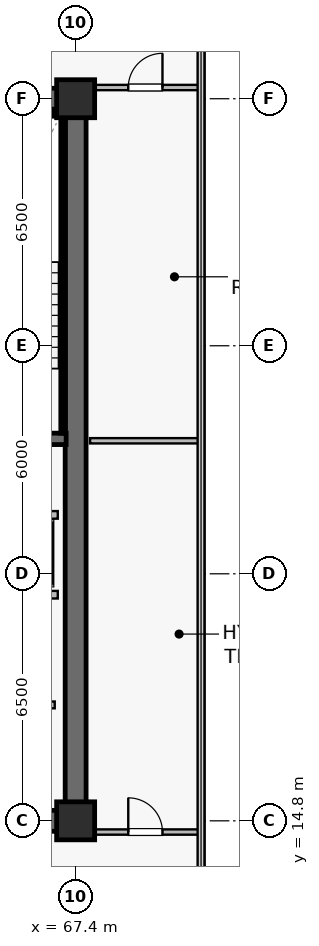
"""IFC4 building model, lengths in metres.
Left out: names, types, materials, properties, quantities, classifications, styles, units other than length and angle.
Written with IfcOpenShell. Run it as: python <this file> out.ifc"""

import sys

from ifc_helpers import new_model, si_unit, direction, frame, frame_2d, origin, origin_2d, place, context, subcontext, project, spatial, rectangle, extrude, source, transform, mapped, element, fill, save


model = new_model("IFC4")
c1 = context("Model", 3, precision=1e-05, world=origin(), true_north=direction((0.0, 1.0)))
c2 = subcontext(c1, "Body", "Model", "MODEL_VIEW")
j1 = project(units=[si_unit("LENGTHUNIT", "METRE"), si_unit("PLANEANGLEUNIT", "RADIAN")], contexts=[c1])
p1 = place(None, origin())
s1 = spatial("IfcSite", under=j1, at=p1, CompositionType="ELEMENT")
p2 = place(p1, origin())
s2 = spatial("IfcBuilding", under=s1, at=p2, CompositionType="ELEMENT")
p3 = place(p2, frame((0.0, 0.0, 221.9)))
s3 = spatial("IfcBuildingStorey", under=s2, at=p3, CompositionType="ELEMENT", Elevation=221.9)
p4 = place(p3, frame((52.325, 14.8, 0.0), z_axis=(0.0, 0.0, 1.0), x_axis=(1.0, 0.0, 0.0)))
e1 = element("IfcWall", 1, at=p4, inside=s3, PredefinedType="SHEAR", context=c2, shape_type="SweptSolid", body=[
    extrude(rectangle(XDim=15.35, YDim=0.55, at=frame_2d((7.675, 0.0))), origin(), (0.0, 0.0, 1.0), 3.8),
])
p5 = place(p3, frame((52.325, 33.8, 0.0), z_axis=(0.0, 0.0, 1.0), x_axis=(1.0, 0.0, 0.0)))
e2 = element("IfcWall", 2, at=p5, inside=s3, PredefinedType="SHEAR", context=c2, shape_type="SweptSolid", body=[
    extrude(rectangle(XDim=15.35, YDim=0.55, at=frame_2d((7.675, 0.0))), origin(), (0.0, 0.0, 1.0), 3.8),
])
p6 = place(p5, frame((8.775, 0.0, 0.0)))
e3 = element("IfcOpeningElement", 3, at=p6, cuts=e2, PredefinedType="OPENING", context=c2, shape_type="SweptSolid", body=[
    extrude(rectangle(XDim=0.95, YDim=2.15, at=frame_2d((0.475, 1.075))), frame((0.0, 0.285, 0.0), z_axis=(0.0, -1.0, 0.0), x_axis=(1.0, 0.0, 0.0)), (0.0, 0.0, 1.0), 0.57),
])
p7 = place(p5, frame((5.41, 0.0, 0.0)))
e4 = element("IfcOpeningElement", 4, at=p7, cuts=e2, PredefinedType="OPENING", context=c2, shape_type="SweptSolid", body=[
    extrude(rectangle(XDim=0.95, YDim=2.15, at=frame_2d((0.475, 1.075))), frame((0.0, 0.285, 0.0), z_axis=(0.0, -1.0, 0.0), x_axis=(1.0, 0.0, 0.0)), (0.0, 0.0, 1.0), 0.57),
])
p8 = place(p5, frame((2.01, 0.0, 0.0)))
e5 = element("IfcOpeningElement", 5, at=p8, cuts=e2, PredefinedType="OPENING", context=c2, shape_type="SweptSolid", body=[
    extrude(rectangle(XDim=0.95, YDim=2.15, at=frame_2d((0.475, 1.075))), frame((0.0, 0.285, 0.0), z_axis=(0.0, -1.0, 0.0), x_axis=(1.0, 0.0, 0.0)), (0.0, 0.0, 1.0), 0.57),
])
p9 = place(p3, frame((67.4, 15.075, 0.0), z_axis=(0.0, 0.0, 1.0), x_axis=(0.0, 1.0, 0.0)))
e6 = element("IfcWall", 6, at=p9, inside=s3, PredefinedType="SHEAR", context=c2, shape_type="SweptSolid", body=[
    extrude(rectangle(XDim=18.45, YDim=0.55, at=frame_2d((9.225, 0.0))), origin(), (0.0, 0.0, 1.0), 3.8),
])
p10 = place(p3, frame((63.35, 24.85, 0.0), z_axis=(0.0, 0.0, 1.0), x_axis=(1.0, 0.0, 0.0)))
e7 = element("IfcWall", 7, at=p10, inside=s3, PredefinedType="SHEAR", context=c2, shape_type="SweptSolid", body=[
    extrude(rectangle(XDim=3.8, YDim=0.3, at=frame_2d((1.9, 0.0))), origin(), (0.0, 0.0, 1.0), 3.8),
])
p11 = place(p3, frame((63.35, 33.4, 0.0), z_axis=(0.0, 0.0, 1.0), x_axis=(1.0, 0.0, 0.0)))
e8 = element("IfcWall", 8, at=p11, inside=s3, PredefinedType="SOLIDWALL", context=c2, shape_type="SweptSolid", body=[
    extrude(rectangle(XDim=3.72, YDim=0.12, at=frame_2d((1.86, 0.0))), origin(), (0.0, 0.0, 1.0), 3.8),
])
p12 = place(p3, frame((67.07, 25.0, 0.0), z_axis=(0.0, 0.0, 1.0), x_axis=(0.0, 1.0, 0.0)))
e9 = element("IfcWall", 9, at=p12, inside=s3, PredefinedType="SOLIDWALL", context=c2, shape_type="SweptSolid", body=[
    extrude(rectangle(XDim=8.32, YDim=0.12, at=frame_2d((4.16, 0.0))), origin(), (0.0, 0.0, 1.0), 3.8),
])
m1 = source(origin(), c2, "Body", "SweptSolid", [
    extrude(rectangle(XDim=1.0, YDim=1.0, at=origin_2d()), origin(), (0.0, 0.0, 1.0), 4.1),
])
for number, where, z_axis, x_axis in (
    (10, (67.4, 14.8, 0.0), (0.0, 0.0, 1.0), (1.0, 0.0, 0.0)),
    (11, (67.4, 33.8, 0.0), (0.0, 0.0, 1.0), (1.0, 0.0, 0.0)),
):
    element("IfcColumn", number, at=place(p3, frame(where, z_axis=z_axis, x_axis=x_axis)), inside=s3, PredefinedType="COLUMN", context=c2, shape_type="MappedRepresentation", body=[
        mapped(m1, transform((0.0, 0.0, 0.0), scale=1.0)),
    ])
p13 = place(p3, frame((64.67, 20.75, 0.0), z_axis=(0.0, 0.0, 1.0), x_axis=(1.0, 0.0, 0.0)))
e12 = element("IfcWall", 12, at=p13, inside=s3, PredefinedType="SOLIDWALL", context=c2, shape_type="SweptSolid", body=[
    extrude(rectangle(XDim=2.26, YDim=0.2, at=frame_2d((1.13, 0.0))), origin(), (0.0, 0.0, 1.0), 3.8),
])
p14 = place(p13, frame((0.58, 0.0, 0.0)))
e13 = element("IfcOpeningElement", 13, at=p14, cuts=e12, PredefinedType="OPENING", context=c2, shape_type="SweptSolid", body=[
    extrude(rectangle(XDim=1.1, YDim=2.22, at=frame_2d((0.55, 1.11))), frame((0.0, 0.11, 0.0), z_axis=(0.0, -1.0, 0.0), x_axis=(1.0, 0.0, 0.0)), (0.0, 0.0, 1.0), 0.22),
])
p15 = place(p3, frame((64.67, 22.85, 0.0), z_axis=(0.0, 0.0, 1.0), x_axis=(1.0, 0.0, 0.0)))
e14 = element("IfcWall", 14, at=p15, inside=s3, PredefinedType="SOLIDWALL", context=c2, shape_type="SweptSolid", body=[
    extrude(rectangle(XDim=2.26, YDim=0.2, at=frame_2d((1.13, 0.0))), origin(), (0.0, 0.0, 1.0), 3.8),
])
p16 = place(p3, frame((61.85, 17.85, 0.0), z_axis=(0.0, 0.0, 1.0), x_axis=(1.0, 0.0, 0.0)))
e15 = element("IfcWall", 15, at=p16, inside=s3, PredefinedType="SOLIDWALL", context=c2, shape_type="SweptSolid", body=[
    extrude(rectangle(XDim=5.0, YDim=0.18, at=frame_2d((2.5, 0.0))), origin(), (0.0, 0.0, 1.0), 3.8),
])
p17 = place(p16, frame((2.025, 0.0, 0.0)))
e16 = element("IfcOpeningElement", 16, at=p17, cuts=e15, PredefinedType="OPENING", context=c2, shape_type="SweptSolid", body=[
    extrude(rectangle(XDim=0.95, YDim=2.15, at=frame_2d((0.475, 1.075))), frame((0.0, 0.1, 0.0), z_axis=(0.0, -1.0, 0.0), x_axis=(1.0, 0.0, 0.0)), (0.0, 0.0, 1.0), 0.2),
])
p18 = place(p3, frame((67.78, 24.8, 0.0), z_axis=(0.0, 0.0, 1.0), x_axis=(1.0, 0.0, 0.0)))
e17 = element("IfcWall", 17, at=p18, inside=s3, PredefinedType="PARTITIONING", context=c2, shape_type="SweptSolid", body=[
    extrude(rectangle(XDim=2.91, YDim=0.14, at=frame_2d((1.455, 0.0))), origin(), (0.0, 0.0, 1.0), 3.8),
])
p19 = place(p3, frame((67.78, 14.505, 0.0), z_axis=(0.0, 0.0, 1.0), x_axis=(1.0, 0.0, 0.0)))
e18 = element("IfcWall", 18, at=p19, inside=s3, PredefinedType="PARTITIONING", context=c2, shape_type="SweptSolid", body=[
    extrude(rectangle(XDim=2.91, YDim=0.14, at=frame_2d((1.455, 0.0))), origin(), (0.0, 0.0, 1.0), 3.8),
])
p20 = place(p19, frame((1.005, 0.0, 0.0)))
e19 = element("IfcOpeningElement", 19, at=p20, cuts=e18, PredefinedType="OPENING", context=c2, shape_type="SweptSolid", body=[
    extrude(rectangle(XDim=0.9, YDim=2.1, at=frame_2d((0.45, 1.05))), frame((0.0, 0.08, 0.0), z_axis=(0.0, -1.0, 0.0), x_axis=(1.0, 0.0, 0.0)), (0.0, 0.0, 1.0), 0.16),
])
p21 = place(p3, frame((67.78, 34.095, 0.0), z_axis=(0.0, 0.0, 1.0), x_axis=(1.0, 0.0, 0.0)))
e20 = element("IfcWall", 20, at=p21, inside=s3, PredefinedType="PARTITIONING", context=c2, shape_type="SweptSolid", body=[
    extrude(rectangle(XDim=2.91, YDim=0.14, at=frame_2d((1.455, 0.0))), origin(), (0.0, 0.0, 1.0), 3.8),
])
p22 = place(p21, frame((1.005, 0.0, 0.0)))
e21 = element("IfcOpeningElement", 21, at=p22, cuts=e20, PredefinedType="OPENING", context=c2, shape_type="SweptSolid", body=[
    extrude(rectangle(XDim=0.9, YDim=2.1, at=frame_2d((0.45, 1.05))), frame((0.0, 0.08, 0.0), z_axis=(0.0, -1.0, 0.0), x_axis=(1.0, 0.0, 0.0)), (0.0, 0.0, 1.0), 0.16),
])
m2 = source(origin(), c2, "Body", "SweptSolid", [
    extrude(rectangle(XDim=0.9, YDim=2.1, at=frame_2d((0.45, 1.05))), frame((0.0, 0.025, 0.0), z_axis=(0.0, -1.0, 0.0), x_axis=(1.0, 0.0, 0.0)), (0.0, 0.0, 1.0), 0.05),
])
p23 = place(p20, origin())
e22 = element("IfcDoor", 22, at=p23, inside=s3, OperationType="SINGLE_SWING_LEFT", PredefinedType="DOOR", context=c2, shape_type="MappedRepresentation", body=[
    mapped(m2, transform((0.0, 0.0, 0.0), scale=1.0)),
])
fill(e19, e22)
p24 = place(p22, origin())
e23 = element("IfcDoor", 23, at=p24, inside=s3, OperationType="SINGLE_SWING_RIGHT", PredefinedType="DOOR", context=c2, shape_type="MappedRepresentation", body=[
    mapped(m2, transform((0.0, 0.0, 0.0), scale=1.0)),
])
fill(e21, e23)
save(model, sys.argv[1])
